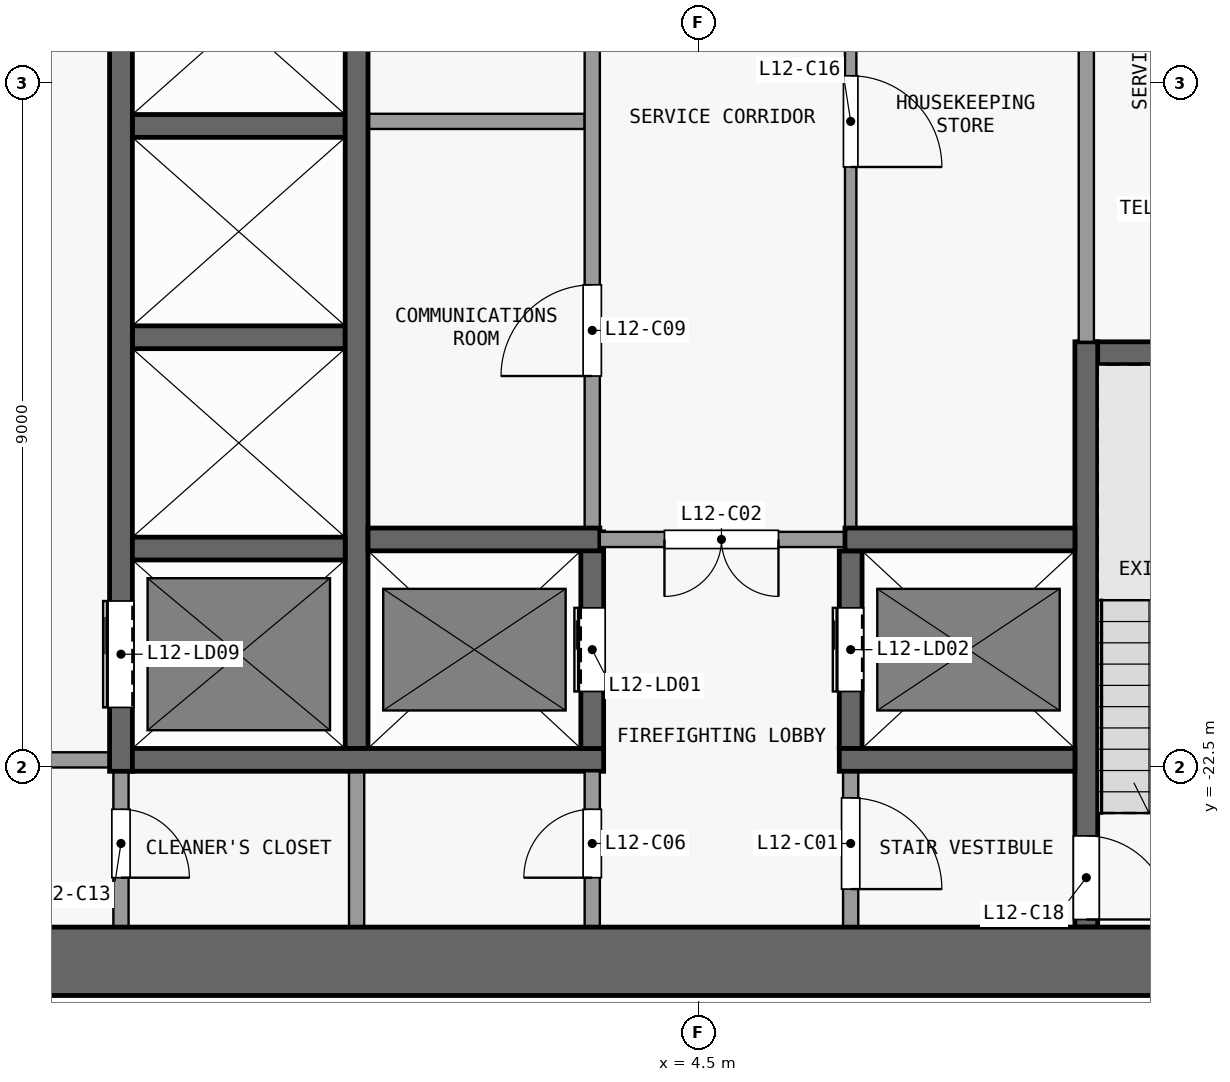
"""IFC4 building model, lengths in metres.
Left out: names, types, materials, properties, quantities, classifications, styles, units other than length and angle.
Written with IfcOpenShell. Run it as: python <this file> out.ifc"""

import sys

from ifc_helpers import new_model, si_unit, direction, frame, frame_2d, origin, place, context, subcontext, project, spatial, rectangle, extrude, element, fill, save


model = new_model("IFC4")
c1 = context("Model", 3, precision=1e-05, world=origin(), true_north=direction((0.0, 1.0)))
c2 = subcontext(c1, "Body", "Model", "MODEL_VIEW")
j1 = project(units=[si_unit("LENGTHUNIT", "METRE"), si_unit("PLANEANGLEUNIT", "RADIAN")], contexts=[c1])
p1 = place(None, origin())
s1 = spatial("IfcSite", under=j1, at=p1, CompositionType="ELEMENT")
p2 = place(p1, origin())
s2 = spatial("IfcBuilding", under=s1, at=p2, CompositionType="ELEMENT")
p3 = place(p2, frame((0.0, 0.0, 54.1)))
s3 = spatial("IfcBuildingStorey", under=s2, at=p3, CompositionType="ELEMENT", Elevation=54.1)
p4 = place(p3, frame((-13.5, -25.05, 0.0), z_axis=(0.0, 0.0, 1.0), x_axis=(1.0, 0.0, 0.0)))
e1 = element("IfcWall", 1, at=p4, inside=s3, PredefinedType="SHEAR", context=c2, shape_type="SweptSolid", body=[
    extrude(rectangle(XDim=27.0, YDim=0.9, at=frame_2d((13.5, 0.0))), origin(), (0.0, 0.0, 1.0), 3.3),
])
p5 = place(p3, frame((-3.25, -22.4, 0.0), z_axis=(0.0, 0.0, 1.0), x_axis=(-1.0, 0.0, 0.0)))
e2 = element("IfcWall", 2, at=p5, inside=s3, PredefinedType="PARTITIONING", context=c2, shape_type="SweptSolid", body=[
    extrude(rectangle(XDim=3.1, YDim=0.2, at=frame_2d((1.55, 0.0))), origin(), (0.0, 0.0, 1.0), 3.3),
])
p6 = place(p5, frame((0.8, 0.0, 0.0)))
e3 = element("IfcOpeningElement", 3, at=p6, cuts=e2, PredefinedType="OPENING", context=c2, shape_type="SweptSolid", body=[
    extrude(rectangle(XDim=1.5, YDim=2.1, at=frame_2d((0.75, 1.05))), frame((0.0, 0.11, 0.0), z_axis=(0.0, -1.0, 0.0), x_axis=(1.0, 0.0, 0.0)), (0.0, 0.0, 1.0), 0.22),
])
p7 = place(p3, frame((-2.95, -22.4, 0.0), z_axis=(0.0, 0.0, 1.0), x_axis=(1.0, 0.0, 0.0)))
e4 = element("IfcWall", 4, at=p7, inside=s3, PredefinedType="SHEAR", context=c2, shape_type="SweptSolid", body=[
    extrude(rectangle(XDim=6.2, YDim=0.3, at=frame_2d((3.1, 0.0))), origin(), (0.0, 0.0, 1.0), 3.3),
])
p8 = place(p3, frame((6.35, -22.4, 0.0), z_axis=(0.0, 0.0, 1.0), x_axis=(1.0, 0.0, 0.0)))
e5 = element("IfcWall", 5, at=p8, inside=s3, PredefinedType="SHEAR", context=c2, shape_type="SweptSolid", body=[
    extrude(rectangle(XDim=3.1, YDim=0.3, at=frame_2d((1.55, 0.0))), origin(), (0.0, 0.0, 1.0), 3.3),
])
p9 = place(p3, frame((-2.95, -19.62, 0.0), z_axis=(0.0, 0.0, 1.0), x_axis=(1.0, 0.0, 0.0)))
e6 = element("IfcWall", 6, at=p9, inside=s3, PredefinedType="SHEAR", context=c2, shape_type="SweptSolid", body=[
    extrude(rectangle(XDim=2.8, YDim=0.3, at=frame_2d((1.4, 0.0))), origin(), (0.0, 0.0, 1.0), 3.3),
])
p10 = place(p3, frame((0.15, -19.5, 0.0), z_axis=(0.0, 0.0, 1.0), x_axis=(1.0, 0.0, 0.0)))
e7 = element("IfcWall", 7, at=p10, inside=s3, PredefinedType="SHEAR", context=c2, shape_type="SweptSolid", body=[
    extrude(rectangle(XDim=3.05, YDim=0.3, at=frame_2d((1.525, 0.0))), origin(), (0.0, 0.0, 1.0), 3.3),
])
p11 = place(p3, frame((6.575, -19.5, 0.0), z_axis=(0.0, 0.0, 1.0), x_axis=(-1.0, 0.0, 0.0)))
e8 = element("IfcWall", 8, at=p11, inside=s3, PredefinedType="PARTITIONING", context=c2, shape_type="SweptSolid", body=[
    extrude(rectangle(XDim=3.375, YDim=0.2, at=frame_2d((1.688, 0.0))), origin(), (0.0, 0.0, 1.0), 3.3),
])
p12 = place(p11, frame((1.025, 0.0, 0.0)))
e9 = element("IfcOpeningElement", 9, at=p12, cuts=e8, PredefinedType="OPENING", context=c2, shape_type="SweptSolid", body=[
    extrude(rectangle(XDim=1.5, YDim=2.1, at=frame_2d((0.75, 1.05))), frame((0.0, 0.11, 0.0), z_axis=(0.0, -1.0, 0.0), x_axis=(1.0, 0.0, 0.0)), (0.0, 0.0, 1.0), 0.22),
])
p13 = place(p3, frame((6.425, -19.5, 0.0), z_axis=(0.0, 0.0, 1.0), x_axis=(1.0, 0.0, 0.0)))
e10 = element("IfcWall", 10, at=p13, inside=s3, PredefinedType="SHEAR", context=c2, shape_type="SweptSolid", body=[
    extrude(rectangle(XDim=3.025, YDim=0.3, at=frame_2d((1.512, 0.0))), origin(), (0.0, 0.0, 1.0), 3.3),
])
p14 = place(p3, frame((9.5, -17.05, 0.0), z_axis=(0.0, 0.0, 1.0), x_axis=(1.0, 0.0, 0.0)))
e11 = element("IfcWall", 11, at=p14, inside=s3, PredefinedType="SHEAR", context=c2, shape_type="SweptSolid", body=[
    extrude(rectangle(XDim=3.1, YDim=0.3, at=frame_2d((1.55, 0.0))), origin(), (0.0, 0.0, 1.0), 3.3),
])
for number, where, z_axis, x_axis in (
    (12, (-2.95, -16.84, 0.0), (0.0, 0.0, 1.0), (1.0, 0.0, 0.0)),
    (13, (-2.95, -14.06, 0.0), (0.0, 0.0, 1.0), (1.0, 0.0, 0.0)),
):
    element("IfcWall", number, at=place(p3, frame(where, z_axis=z_axis, x_axis=x_axis)), inside=s3, PredefinedType="SHEAR", context=c2, shape_type="SweptSolid", body=[
        extrude(rectangle(XDim=2.8, YDim=0.3, at=frame_2d((1.4, 0.0))), origin(), (0.0, 0.0, 1.0), 3.3),
    ])
p15 = place(p3, frame((0.15, -14.0, 0.0), z_axis=(0.0, 0.0, 1.0), x_axis=(1.0, 0.0, 0.0)))
e14 = element("IfcWall", 14, at=p15, inside=s3, PredefinedType="PARTITIONING", context=c2, shape_type="SweptSolid", body=[
    extrude(rectangle(XDim=2.85, YDim=0.2, at=frame_2d((1.425, 0.0))), origin(), (0.0, 0.0, 1.0), 3.3),
])
p16 = place(p3, frame((-3.1, -22.55, 0.0), z_axis=(0.0, 0.0, 1.0), x_axis=(0.0, -1.0, 0.0)))
e15 = element("IfcWall", 15, at=p16, inside=s3, PredefinedType="PARTITIONING", context=c2, shape_type="SweptSolid", body=[
    extrude(rectangle(XDim=2.05, YDim=0.2, at=frame_2d((1.025, 0.0))), origin(), (0.0, 0.0, 1.0), 3.3),
])
p17 = place(p16, frame((0.5, 0.0, 0.0)))
e16 = element("IfcOpeningElement", 16, at=p17, cuts=e15, PredefinedType="OPENING", context=c2, shape_type="SweptSolid", body=[
    extrude(rectangle(XDim=0.9, YDim=2.1, at=frame_2d((0.45, 1.05))), frame((0.0, 0.11, 0.0), z_axis=(0.0, -1.0, 0.0), x_axis=(1.0, 0.0, 0.0)), (0.0, 0.0, 1.0), 0.22),
])
p18 = place(p3, frame((-3.1, -22.55, 0.0), z_axis=(0.0, 0.0, 1.0), x_axis=(0.0, 1.0, 0.0)))
e17 = element("IfcWall", 17, at=p18, inside=s3, PredefinedType="SHEAR", context=c2, shape_type="SweptSolid", body=[
    extrude(rectangle(XDim=14.05, YDim=0.3, at=frame_2d((7.025, 0.0))), origin(), (0.0, 0.0, 1.0), 3.3),
])
p19 = place(p18, frame((12.11, 0.0, 0.0)))
e18 = element("IfcOpeningElement", 18, at=p19, cuts=e17, PredefinedType="OPENING", context=c2, shape_type="SweptSolid", body=[
    extrude(rectangle(XDim=1.1, YDim=2.1, at=frame_2d((0.55, 1.05))), frame((0.0, 0.16, 0.0), z_axis=(0.0, -1.0, 0.0), x_axis=(1.0, 0.0, 0.0)), (0.0, 0.0, 1.0), 0.32),
])
p20 = place(p18, frame((0.84, 0.0, 0.0)))
e19 = element("IfcOpeningElement", 19, at=p20, cuts=e17, PredefinedType="OPENING", context=c2, shape_type="SweptSolid", body=[
    extrude(rectangle(XDim=1.4, YDim=2.1, at=frame_2d((0.7, 1.05))), frame((0.0, 0.16, 0.0), z_axis=(0.0, -1.0, 0.0), x_axis=(1.0, 0.0, 0.0)), (0.0, 0.0, 1.0), 0.32),
])
p21 = place(p3, frame((0.0, -24.6, 0.0), z_axis=(0.0, 0.0, 1.0), x_axis=(0.0, 1.0, 0.0)))
e20 = element("IfcWall", 20, at=p21, inside=s3, PredefinedType="PARTITIONING", context=c2, shape_type="SweptSolid", body=[
    extrude(rectangle(XDim=2.05, YDim=0.2, at=frame_2d((1.025, 0.0))), origin(), (0.0, 0.0, 1.0), 3.3),
])
p22 = place(p3, frame((0.0, -22.25, 0.0), z_axis=(0.0, 0.0, 1.0), x_axis=(0.0, 1.0, 0.0)))
e21 = element("IfcWall", 21, at=p22, inside=s3, PredefinedType="SHEAR", context=c2, shape_type="SweptSolid", body=[
    extrude(rectangle(XDim=13.75, YDim=0.3, at=frame_2d((6.875, 0.0))), origin(), (0.0, 0.0, 1.0), 3.3),
])
p23 = place(p3, frame((3.1, -24.6, 0.0), z_axis=(0.0, 0.0, 1.0), x_axis=(0.0, 1.0, 0.0)))
e22 = element("IfcWall", 22, at=p23, inside=s3, PredefinedType="PARTITIONING", context=c2, shape_type="SweptSolid", body=[
    extrude(rectangle(XDim=2.05, YDim=0.2, at=frame_2d((1.025, 0.0))), origin(), (0.0, 0.0, 1.0), 3.3),
])
p24 = place(p23, frame((0.65, 0.0, 0.0)))
e23 = element("IfcOpeningElement", 23, at=p24, cuts=e22, PredefinedType="OPENING", context=c2, shape_type="SweptSolid", body=[
    extrude(rectangle(XDim=0.9, YDim=2.1, at=frame_2d((0.45, 1.05))), frame((0.0, 0.11, 0.0), z_axis=(0.0, -1.0, 0.0), x_axis=(1.0, 0.0, 0.0)), (0.0, 0.0, 1.0), 0.22),
])
p25 = place(p3, frame((3.1, -22.25, 0.0), z_axis=(0.0, 0.0, 1.0), x_axis=(0.0, 1.0, 0.0)))
e24 = element("IfcWall", 24, at=p25, inside=s3, PredefinedType="SHEAR", context=c2, shape_type="SweptSolid", body=[
    extrude(rectangle(XDim=2.85, YDim=0.3, at=frame_2d((1.425, 0.0))), origin(), (0.0, 0.0, 1.0), 3.3),
])
p26 = place(p25, frame((0.75, 0.0, 0.0)))
e25 = element("IfcOpeningElement", 25, at=p26, cuts=e24, PredefinedType="OPENING", context=c2, shape_type="SweptSolid", body=[
    extrude(rectangle(XDim=1.1, YDim=2.1, at=frame_2d((0.55, 1.05))), frame((0.0, 0.16, 0.0), z_axis=(0.0, -1.0, 0.0), x_axis=(1.0, 0.0, 0.0)), (0.0, 0.0, 1.0), 0.32),
])
p27 = place(p3, frame((3.1, -19.6, 0.0), z_axis=(0.0, 0.0, 1.0), x_axis=(0.0, 1.0, 0.0)))
e26 = element("IfcWall", 26, at=p27, inside=s3, PredefinedType="PARTITIONING", context=c2, shape_type="SweptSolid", body=[
    extrude(rectangle(XDim=11.1, YDim=0.2, at=frame_2d((5.55, 0.0))), origin(), (0.0, 0.0, 1.0), 3.3),
])
p28 = place(p27, frame((2.25, 0.0, 0.0)))
e27 = element("IfcOpeningElement", 27, at=p28, cuts=e26, PredefinedType="OPENING", context=c2, shape_type="SweptSolid", body=[
    extrude(rectangle(XDim=1.2, YDim=2.1, at=frame_2d((0.6, 1.05))), frame((0.0, 0.11, 0.0), z_axis=(0.0, -1.0, 0.0), x_axis=(1.0, 0.0, 0.0)), (0.0, 0.0, 1.0), 0.22),
])
p29 = place(p27, frame((7.75, 0.0, 0.0)))
e28 = element("IfcOpeningElement", 28, at=p29, cuts=e26, PredefinedType="OPENING", context=c2, shape_type="SweptSolid", body=[
    extrude(rectangle(XDim=1.2, YDim=2.1, at=frame_2d((0.6, 1.05))), frame((0.0, 0.11, 0.0), z_axis=(0.0, -1.0, 0.0), x_axis=(1.0, 0.0, 0.0)), (0.0, 0.0, 1.0), 0.22),
])
p30 = place(p3, frame((6.5, -22.55, 0.0), z_axis=(0.0, 0.0, 1.0), x_axis=(0.0, -1.0, 0.0)))
e29 = element("IfcWall", 29, at=p30, inside=s3, PredefinedType="PARTITIONING", context=c2, shape_type="SweptSolid", body=[
    extrude(rectangle(XDim=2.05, YDim=0.2, at=frame_2d((1.025, 0.0))), origin(), (0.0, 0.0, 1.0), 3.3),
])
p31 = place(p30, frame((0.35, 0.0, 0.0)))
e30 = element("IfcOpeningElement", 30, at=p31, cuts=e29, PredefinedType="OPENING", context=c2, shape_type="SweptSolid", body=[
    extrude(rectangle(XDim=1.2, YDim=2.1, at=frame_2d((0.6, 1.05))), frame((0.0, 0.11, 0.0), z_axis=(0.0, -1.0, 0.0), x_axis=(1.0, 0.0, 0.0)), (0.0, 0.0, 1.0), 0.22),
])
p32 = place(p3, frame((6.5, -22.25, 0.0), z_axis=(0.0, 0.0, 1.0), x_axis=(0.0, 1.0, 0.0)))
e31 = element("IfcWall", 31, at=p32, inside=s3, PredefinedType="SHEAR", context=c2, shape_type="SweptSolid", body=[
    extrude(rectangle(XDim=2.6, YDim=0.3, at=frame_2d((1.3, 0.0))), origin(), (0.0, 0.0, 1.0), 3.3),
])
p33 = place(p32, frame((0.75, 0.0, 0.0)))
e32 = element("IfcOpeningElement", 32, at=p33, cuts=e31, PredefinedType="OPENING", context=c2, shape_type="SweptSolid", body=[
    extrude(rectangle(XDim=1.1, YDim=2.1, at=frame_2d((0.55, 1.05))), frame((0.0, 0.16, 0.0), z_axis=(0.0, -1.0, 0.0), x_axis=(1.0, 0.0, 0.0)), (0.0, 0.0, 1.0), 0.32),
])
p34 = place(p3, frame((6.5, -8.5, 0.0), z_axis=(0.0, 0.0, 1.0), x_axis=(0.0, -1.0, 0.0)))
e33 = element("IfcWall", 33, at=p34, inside=s3, PredefinedType="PARTITIONING", context=c2, shape_type="SweptSolid", body=[
    extrude(rectangle(XDim=10.85, YDim=0.15, at=frame_2d((5.425, 0.0))), origin(), (0.0, 0.0, 1.0), 3.3),
])
p35 = place(p34, frame((4.9, 0.0, 0.0)))
e34 = element("IfcOpeningElement", 34, at=p35, cuts=e33, PredefinedType="OPENING", context=c2, shape_type="SweptSolid", body=[
    extrude(rectangle(XDim=1.2, YDim=2.1, at=frame_2d((0.6, 1.05))), frame((0.0, 0.085, 0.0), z_axis=(0.0, -1.0, 0.0), x_axis=(1.0, 0.0, 0.0)), (0.0, 0.0, 1.0), 0.17),
])
p36 = place(p3, frame((9.6, -16.9, 0.0), z_axis=(0.0, 0.0, 1.0), x_axis=(0.0, -1.0, 0.0)))
e35 = element("IfcWall", 35, at=p36, inside=s3, PredefinedType="SHEAR", context=c2, shape_type="SweptSolid", body=[
    extrude(rectangle(XDim=7.7, YDim=0.3, at=frame_2d((3.85, 0.0))), origin(), (0.0, 0.0, 1.0), 3.3),
])
p37 = place(p36, frame((6.5, 0.0, 0.0)))
e36 = element("IfcOpeningElement", 36, at=p37, cuts=e35, PredefinedType="OPENING", context=c2, shape_type="SweptSolid", body=[
    extrude(rectangle(XDim=1.1, YDim=2.1, at=frame_2d((0.55, 1.05))), frame((0.0, 0.16, 0.0), z_axis=(0.0, -1.0, 0.0), x_axis=(1.0, 0.0, 0.0)), (0.0, 0.0, 1.0), 0.32),
])
p38 = place(p3, frame((9.6, -16.9, 0.0), z_axis=(0.0, 0.0, 1.0), x_axis=(0.0, 1.0, 0.0)))
e37 = element("IfcWall", 37, at=p38, inside=s3, PredefinedType="PARTITIONING", context=c2, shape_type="SweptSolid", body=[
    extrude(rectangle(XDim=8.4, YDim=0.2, at=frame_2d((4.2, 0.0))), origin(), (0.0, 0.0, 1.0), 3.3),
])
p39 = place(p26, origin())
e38 = element("IfcDoor", 38, at=p39, inside=s3, OperationType="DOUBLE_DOOR_SLIDING", PredefinedType="DOOR", context=c2, shape_type="SweptSolid", body=[
    extrude(rectangle(XDim=1.1, YDim=2.1, at=frame_2d((0.55, 1.05))), frame((0.0, 0.025, 0.0), z_axis=(0.0, -1.0, 0.0), x_axis=(1.0, 0.0, 0.0)), (0.0, 0.0, 1.0), 0.05),
])
fill(e25, e38)
p40 = place(p33, origin())
e39 = element("IfcDoor", 39, at=p40, inside=s3, OperationType="DOUBLE_DOOR_SLIDING", PredefinedType="DOOR", context=c2, shape_type="SweptSolid", body=[
    extrude(rectangle(XDim=1.1, YDim=2.1, at=frame_2d((0.55, 1.05))), frame((0.0, 0.025, 0.0), z_axis=(0.0, -1.0, 0.0), x_axis=(1.0, 0.0, 0.0)), (0.0, 0.0, 1.0), 0.05),
])
fill(e32, e39)
p41 = place(p20, origin())
e40 = element("IfcDoor", 40, at=p41, inside=s3, OperationType="DOUBLE_DOOR_SLIDING", PredefinedType="DOOR", context=c2, shape_type="SweptSolid", body=[
    extrude(rectangle(XDim=1.4, YDim=2.1, at=frame_2d((0.7, 1.05))), frame((0.0, 0.025, 0.0), z_axis=(0.0, -1.0, 0.0), x_axis=(1.0, 0.0, 0.0)), (0.0, 0.0, 1.0), 0.05),
])
fill(e19, e40)
p42 = place(p31, origin())
e41 = element("IfcDoor", 41, at=p42, inside=s3, OperationType="SINGLE_SWING_RIGHT", PredefinedType="DOOR", context=c2, shape_type="SweptSolid", body=[
    extrude(rectangle(XDim=1.2, YDim=2.1, at=frame_2d((0.6, 1.05))), frame((0.0, 0.025, 0.0), z_axis=(0.0, -1.0, 0.0), x_axis=(1.0, 0.0, 0.0)), (0.0, 0.0, 1.0), 0.05),
])
fill(e30, e41)
p43 = place(p12, origin())
e42 = element("IfcDoor", 42, at=p43, inside=s3, OperationType="DOUBLE_DOOR_SINGLE_SWING", PredefinedType="DOOR", context=c2, shape_type="SweptSolid", body=[
    extrude(rectangle(XDim=1.5, YDim=2.1, at=frame_2d((0.75, 1.05))), frame((0.0, 0.025, 0.0), z_axis=(0.0, -1.0, 0.0), x_axis=(1.0, 0.0, 0.0)), (0.0, 0.0, 1.0), 0.05),
])
fill(e9, e42)
p44 = place(p24, origin())
e43 = element("IfcDoor", 43, at=p44, inside=s3, OperationType="SINGLE_SWING_LEFT", PredefinedType="DOOR", context=c2, shape_type="SweptSolid", body=[
    extrude(rectangle(XDim=0.9, YDim=2.1, at=frame_2d((0.45, 1.05))), frame((0.0, 0.025, 0.0), z_axis=(0.0, -1.0, 0.0), x_axis=(1.0, 0.0, 0.0)), (0.0, 0.0, 1.0), 0.05),
])
fill(e23, e43)
p45 = place(p28, origin())
e44 = element("IfcDoor", 44, at=p45, inside=s3, OperationType="SINGLE_SWING_LEFT", PredefinedType="DOOR", context=c2, shape_type="SweptSolid", body=[
    extrude(rectangle(XDim=1.2, YDim=2.1, at=frame_2d((0.6, 1.05))), frame((0.0, 0.025, 0.0), z_axis=(0.0, -1.0, 0.0), x_axis=(1.0, 0.0, 0.0)), (0.0, 0.0, 1.0), 0.05),
])
fill(e27, e44)
p46 = place(p17, origin())
e45 = element("IfcDoor", 45, at=p46, inside=s3, OperationType="SINGLE_SWING_RIGHT", PredefinedType="DOOR", context=c2, shape_type="SweptSolid", body=[
    extrude(rectangle(XDim=0.9, YDim=2.1, at=frame_2d((0.45, 1.05))), frame((0.0, 0.025, 0.0), z_axis=(0.0, -1.0, 0.0), x_axis=(1.0, 0.0, 0.0)), (0.0, 0.0, 1.0), 0.05),
])
fill(e16, e45)
p47 = place(p35, origin())
e46 = element("IfcDoor", 46, at=p47, inside=s3, OperationType="SINGLE_SWING_RIGHT", PredefinedType="DOOR", context=c2, shape_type="SweptSolid", body=[
    extrude(rectangle(XDim=1.2, YDim=2.1, at=frame_2d((0.6, 1.05))), frame((0.0, 0.025, 0.0), z_axis=(0.0, -1.0, 0.0), x_axis=(1.0, 0.0, 0.0)), (0.0, 0.0, 1.0), 0.05),
])
fill(e34, e46)
p48 = place(p37, origin())
e47 = element("IfcDoor", 47, at=p48, inside=s3, OperationType="SINGLE_SWING_RIGHT", PredefinedType="DOOR", context=c2, shape_type="SweptSolid", body=[
    extrude(rectangle(XDim=1.1, YDim=2.1, at=frame_2d((0.55, 1.05))), frame((0.0, 0.025, 0.0), z_axis=(0.0, -1.0, 0.0), x_axis=(1.0, 0.0, 0.0)), (0.0, 0.0, 1.0), 0.05),
])
fill(e36, e47)
save(model, sys.argv[1])
